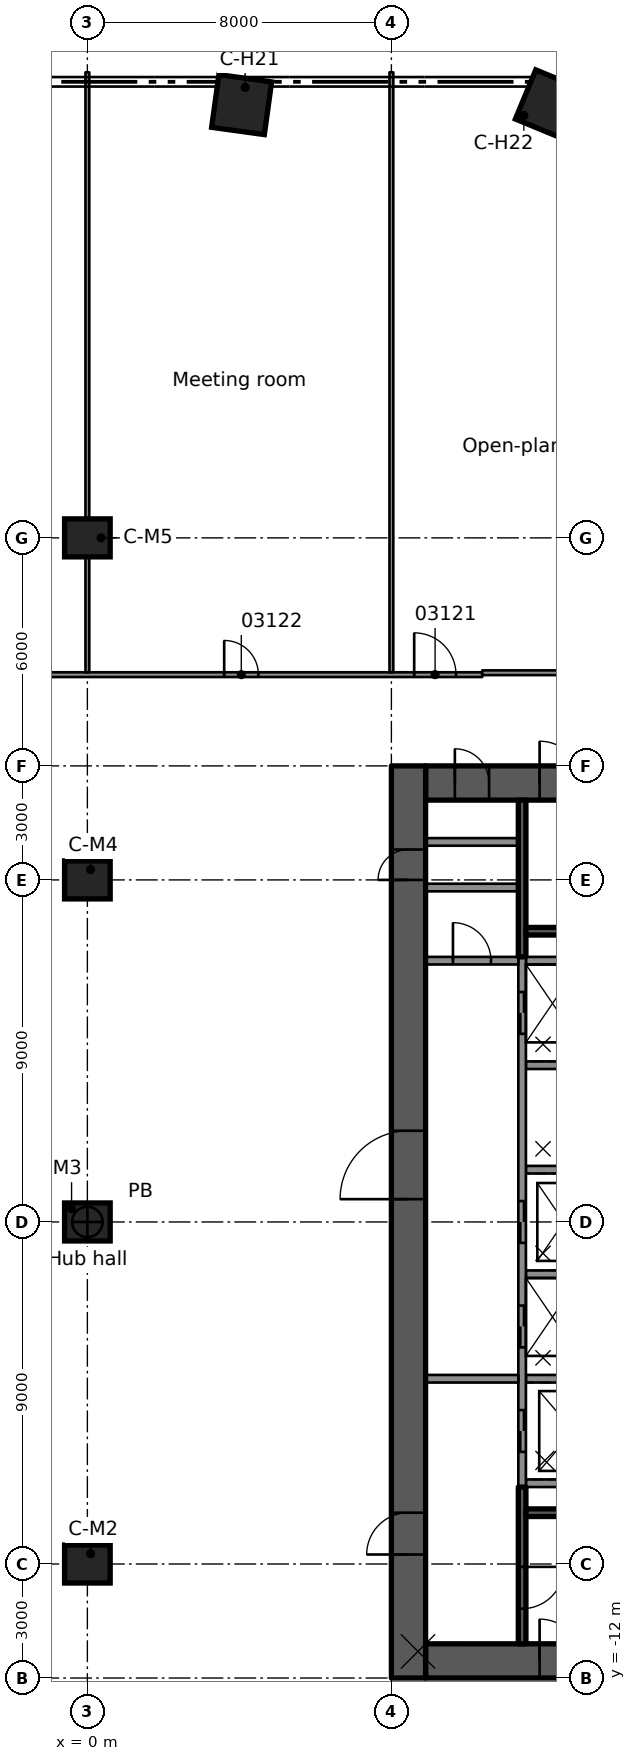
"""IFC4 building model, lengths in metres.
Left out: names, types, materials, properties, quantities, classifications, styles, units other than length and angle.
Written with IfcOpenShell. Run it as: python <this file> out.ifc"""

import sys

from ifc_helpers import new_model, si_unit, direction, frame, frame_2d, origin, origin_2d, place, context, subcontext, project, spatial, rectangle, extrude, element, fill, save


model = new_model("IFC4")
c1 = context("Model", 3, precision=1e-05, world=origin(), true_north=direction((0.0, 1.0)))
c2 = subcontext(c1, "Body", "Model", "MODEL_VIEW")
j1 = project(units=[si_unit("LENGTHUNIT", "METRE"), si_unit("PLANEANGLEUNIT", "RADIAN")], contexts=[c1])
p1 = place(None, origin())
s1 = spatial("IfcSite", under=j1, at=p1, CompositionType="ELEMENT")
p2 = place(p1, origin())
s2 = spatial("IfcBuilding", under=s1, at=p2, CompositionType="ELEMENT")
p3 = place(p2, frame((0.0, 0.0, 15.5)))
s3 = spatial("IfcBuildingStorey", under=s2, at=p3, CompositionType="ELEMENT", Elevation=15.5)
p4 = place(p3, frame((8.9, 11.55, 0.0), z_axis=(0.0, 0.0, 1.0), x_axis=(1.0, 0.0, 0.0)))
e1 = element("IfcWall", 1, at=p4, inside=s3, PredefinedType="SHEAR", context=c2, shape_type="SweptSolid", body=[
    extrude(rectangle(XDim=9.2, YDim=0.9, at=frame_2d((4.6, 0.0))), origin(), (0.0, 0.0, 1.0), 5.0),
])
p5 = place(p4, frame((3.0, 0.0, 0.0)))
e2 = element("IfcOpeningElement", 2, at=p5, cuts=e1, PredefinedType="OPENING", context=c2, shape_type="SweptSolid", body=[
    extrude(rectangle(XDim=1.1, YDim=2.1, at=frame_2d((0.55, 1.05))), frame((0.0, 0.46, 0.0), z_axis=(0.0, -1.0, 0.0), x_axis=(1.0, 0.0, 0.0)), (0.0, 0.0, 1.0), 0.92),
])
p6 = place(p4, frame((0.77, 0.0, 0.0)))
e3 = element("IfcOpeningElement", 3, at=p6, cuts=e1, PredefinedType="OPENING", context=c2, shape_type="SweptSolid", body=[
    extrude(rectangle(XDim=0.9, YDim=2.1, at=frame_2d((0.45, 1.05))), frame((0.0, 0.46, 0.0), z_axis=(0.0, -1.0, 0.0), x_axis=(1.0, 0.0, 0.0)), (0.0, 0.0, 1.0), 0.92),
])
p7 = place(p3, frame((8.9, -11.55, 0.0), z_axis=(0.0, 0.0, 1.0), x_axis=(1.0, 0.0, 0.0)))
e4 = element("IfcWall", 4, at=p7, inside=s3, PredefinedType="SHEAR", context=c2, shape_type="SweptSolid", body=[
    extrude(rectangle(XDim=9.2, YDim=0.9, at=frame_2d((4.6, 0.0))), origin(), (0.0, 0.0, 1.0), 5.0),
])
p8 = place(p7, frame((3.0, 0.0, 0.0)))
e5 = element("IfcOpeningElement", 5, at=p8, cuts=e4, PredefinedType="OPENING", context=c2, shape_type="SweptSolid", body=[
    extrude(rectangle(XDim=1.1, YDim=2.1, at=frame_2d((0.55, 1.05))), frame((0.0, 0.46, 0.0), z_axis=(0.0, -1.0, 0.0), x_axis=(1.0, 0.0, 0.0)), (0.0, 0.0, 1.0), 0.92),
])
p9 = place(p3, frame((8.45, -12.0, 0.0), z_axis=(0.0, 0.0, 1.0), x_axis=(0.0, 1.0, 0.0)))
e6 = element("IfcWall", 6, at=p9, inside=s3, PredefinedType="SHEAR", context=c2, shape_type="SweptSolid", body=[
    extrude(rectangle(XDim=24.0, YDim=0.9, at=frame_2d((12.0, 0.0))), origin(), (0.0, 0.0, 1.0), 5.0),
])
p10 = place(p9, frame((12.6, 0.0, 0.0)))
e7 = element("IfcOpeningElement", 7, at=p10, cuts=e6, PredefinedType="OPENING", context=c2, shape_type="SweptSolid", body=[
    extrude(rectangle(XDim=1.8, YDim=2.1, at=frame_2d((0.9, 1.05))), frame((0.0, 0.46, 0.0), z_axis=(0.0, -1.0, 0.0), x_axis=(1.0, 0.0, 0.0)), (0.0, 0.0, 1.0), 0.92),
])
p11 = place(p9, frame((3.25, 0.0, 0.0)))
e8 = element("IfcOpeningElement", 8, at=p11, cuts=e6, PredefinedType="OPENING", context=c2, shape_type="SweptSolid", body=[
    extrude(rectangle(XDim=1.1, YDim=2.1, at=frame_2d((0.55, 1.05))), frame((0.0, 0.46, 0.0), z_axis=(0.0, -1.0, 0.0), x_axis=(1.0, 0.0, 0.0)), (0.0, 0.0, 1.0), 0.92),
])
p12 = place(p9, frame((21.0, 0.0, 0.0)))
e9 = element("IfcOpeningElement", 9, at=p12, cuts=e6, PredefinedType="OPENING", context=c2, shape_type="SweptSolid", body=[
    extrude(rectangle(XDim=0.8, YDim=2.1, at=frame_2d((0.4, 1.05))), frame((0.0, 0.46, 0.0), z_axis=(0.0, -1.0, 0.0), x_axis=(1.0, 0.0, 0.0)), (0.0, 0.0, 1.0), 0.92),
])
for number, where, z_axis, x_axis in (
    (10, (4.059, 29.4, 0.0), (0.0, 0.0, 1.0), (0.137, 0.991, 0.0)),
    (11, (12.178, 29.4, 0.0), (0.0, 0.0, 1.0), (0.383, 0.924, 0.0)),
):
    element("IfcColumn", number, at=place(p3, frame(where, z_axis=z_axis, x_axis=x_axis)), inside=s3, PredefinedType="COLUMN", context=c2, shape_type="SweptSolid", body=[
        extrude(rectangle(XDim=1.4, YDim=1.4, at=origin_2d()), origin(), (0.0, 0.0, 1.0), 5.0),
    ])
for number, where, z_axis, x_axis in (
    (12, (0.0, -9.0, 0.0), (0.0, 0.0, 1.0), (1.0, 0.0, 0.0)),
    (13, (0.0, 0.0, 0.0), (0.0, 0.0, 1.0), (1.0, 0.0, 0.0)),
    (14, (0.0, 9.0, 0.0), (0.0, 0.0, 1.0), (1.0, 0.0, 0.0)),
    (15, (0.0, 18.0, 0.0), (0.0, 0.0, 1.0), (1.0, 0.0, 0.0)),
):
    element("IfcColumn", number, at=place(p3, frame(where, z_axis=z_axis, x_axis=x_axis)), inside=s3, PredefinedType="COLUMN", context=c2, shape_type="SweptSolid", body=[
        extrude(rectangle(XDim=1.2, YDim=1.0, at=origin_2d()), origin(), (0.0, 0.0, 1.0), 5.0),
    ])
for number, where, z_axis, x_axis in (
    (16, (11.54, -6.875, 0.0), (0.0, 0.0, 1.0), (1.0, 0.0, 0.0)),
    (17, (11.54, 6.875, 0.0), (0.0, 0.0, 1.0), (1.0, 0.0, 0.0)),
):
    element("IfcWall", number, at=place(p3, frame(where, z_axis=z_axis, x_axis=x_axis)), inside=s3, PredefinedType="SOLIDWALL", context=c2, shape_type="SweptSolid", body=[
        extrude(rectangle(XDim=6.56, YDim=0.2, at=frame_2d((3.28, 0.0))), origin(), (0.0, 0.0, 1.0), 4.59),
    ])
p13 = place(p3, frame((11.54, 4.125, 0.0), z_axis=(0.0, 0.0, 1.0), x_axis=(1.0, 0.0, 0.0)))
e18 = element("IfcWall", 18, at=p13, inside=s3, PredefinedType="SOLIDWALL", context=c2, shape_type="SweptSolid", body=[
    extrude(rectangle(XDim=4.7, YDim=0.2, at=frame_2d((2.35, 0.0))), origin(), (0.0, 0.0, 1.0), 4.59),
])
for number, where, z_axis, x_axis in (
    (19, (11.54, 1.375, 0.0), (0.0, 0.0, 1.0), (1.0, 0.0, 0.0)),
    (20, (11.54, -1.375, 0.0), (0.0, 0.0, 1.0), (1.0, 0.0, 0.0)),
):
    element("IfcWall", number, at=place(p3, frame(where, z_axis=z_axis, x_axis=x_axis)), inside=s3, PredefinedType="SOLIDWALL", context=c2, shape_type="SweptSolid", body=[
        extrude(rectangle(XDim=4.2, YDim=0.2, at=frame_2d((2.1, 0.0))), origin(), (0.0, 0.0, 1.0), 4.59),
    ])
p14 = place(p3, frame((11.54, -4.125, 0.0), z_axis=(0.0, 0.0, 1.0), x_axis=(1.0, 0.0, 0.0)))
e21 = element("IfcWall", 21, at=p14, inside=s3, PredefinedType="SOLIDWALL", context=c2, shape_type="SweptSolid", body=[
    extrude(rectangle(XDim=4.7, YDim=0.2, at=frame_2d((2.35, 0.0))), origin(), (0.0, 0.0, 1.0), 4.59),
])
p15 = place(p3, frame((11.44, 6.975, 0.0), z_axis=(0.0, 0.0, 1.0), x_axis=(0.0, -1.0, 0.0)))
e22 = element("IfcWall", 22, at=p15, inside=s3, PredefinedType="SOLIDWALL", context=c2, shape_type="SweptSolid", body=[
    extrude(rectangle(XDim=13.95, YDim=0.2, at=frame_2d((6.975, 0.0))), origin(), (0.0, 0.0, 1.0), 4.59),
])
p16 = place(p15, frame((0.925, 0.0, 0.0)))
e23 = element("IfcOpeningElement", 23, at=p16, cuts=e22, PredefinedType="OPENING", context=c2, shape_type="SweptSolid", body=[
    extrude(rectangle(XDim=1.1, YDim=2.1, at=frame_2d((0.55, 1.05))), frame((0.0, 0.11, 0.0), z_axis=(0.0, -1.0, 0.0), x_axis=(1.0, 0.0, 0.0)), (0.0, 0.0, 1.0), 0.22),
])
p17 = place(p15, frame((6.425, 0.0, 0.0)))
e24 = element("IfcOpeningElement", 24, at=p17, cuts=e22, PredefinedType="OPENING", context=c2, shape_type="SweptSolid", body=[
    extrude(rectangle(XDim=1.1, YDim=2.1, at=frame_2d((0.55, 1.05))), frame((0.0, 0.11, 0.0), z_axis=(0.0, -1.0, 0.0), x_axis=(1.0, 0.0, 0.0)), (0.0, 0.0, 1.0), 0.22),
])
p18 = place(p15, frame((9.175, 0.0, 0.0)))
e25 = element("IfcOpeningElement", 25, at=p18, cuts=e22, PredefinedType="OPENING", context=c2, shape_type="SweptSolid", body=[
    extrude(rectangle(XDim=1.1, YDim=2.1, at=frame_2d((0.55, 1.05))), frame((0.0, 0.11, 0.0), z_axis=(0.0, -1.0, 0.0), x_axis=(1.0, 0.0, 0.0)), (0.0, 0.0, 1.0), 0.22),
])
p19 = place(p15, frame((11.925, 0.0, 0.0)))
e26 = element("IfcOpeningElement", 26, at=p19, cuts=e22, PredefinedType="OPENING", context=c2, shape_type="SweptSolid", body=[
    extrude(rectangle(XDim=1.1, YDim=2.1, at=frame_2d((0.55, 1.05))), frame((0.0, 0.11, 0.0), z_axis=(0.0, -1.0, 0.0), x_axis=(1.0, 0.0, 0.0)), (0.0, 0.0, 1.0), 0.22),
])
p20 = place(p3, frame((11.44, -6.975, 0.0), z_axis=(0.0, 0.0, 1.0), x_axis=(0.0, -1.0, 0.0)))
e27 = element("IfcWall", 27, at=p20, inside=s3, PredefinedType="SOLIDWALL", context=c2, shape_type="SweptSolid", body=[
    extrude(rectangle(XDim=4.125, YDim=0.2, at=frame_2d((2.062, 0.0))), origin(), (0.0, 0.0, 1.0), 4.59),
])
p21 = place(p20, frame((2.1, 0.0, 0.0)))
e28 = element("IfcOpeningElement", 28, at=p21, cuts=e27, PredefinedType="OPENING", context=c2, shape_type="SweptSolid", body=[
    extrude(rectangle(XDim=1.1, YDim=2.1, at=frame_2d((0.55, 1.05))), frame((0.0, 0.11, 0.0), z_axis=(0.0, -1.0, 0.0), x_axis=(1.0, 0.0, 0.0)), (0.0, 0.0, 1.0), 0.22),
])
p22 = place(p3, frame((11.54, -7.65, 0.0), z_axis=(0.0, 0.0, 1.0), x_axis=(1.0, 0.0, 0.0)))
e29 = element("IfcWall", 29, at=p22, inside=s3, PredefinedType="SOLIDWALL", context=c2, shape_type="SweptSolid", body=[
    extrude(rectangle(XDim=6.56, YDim=0.2, at=frame_2d((3.28, 0.0))), origin(), (0.0, 0.0, 1.0), 4.59),
])
p23 = place(p3, frame((11.44, 11.1, 0.0), z_axis=(0.0, 0.0, 1.0), x_axis=(0.0, -1.0, 0.0)))
e30 = element("IfcWall", 30, at=p23, inside=s3, PredefinedType="SOLIDWALL", context=c2, shape_type="SweptSolid", body=[
    extrude(rectangle(XDim=4.125, YDim=0.2, at=frame_2d((2.062, 0.0))), origin(), (0.0, 0.0, 1.0), 4.59),
])
p24 = place(p3, frame((11.54, 7.65, 0.0), z_axis=(0.0, 0.0, 1.0), x_axis=(1.0, 0.0, 0.0)))
e31 = element("IfcWall", 31, at=p24, inside=s3, PredefinedType="SOLIDWALL", context=c2, shape_type="SweptSolid", body=[
    extrude(rectangle(XDim=6.56, YDim=0.2, at=frame_2d((3.28, 0.0))), origin(), (0.0, 0.0, 1.0), 4.59),
])
p25 = place(p3, frame((8.9, -4.125, 0.0), z_axis=(0.0, 0.0, 1.0), x_axis=(1.0, 0.0, 0.0)))
e32 = element("IfcWall", 32, at=p25, inside=s3, PredefinedType="PARTITIONING", context=c2, shape_type="SweptSolid", body=[
    extrude(rectangle(XDim=2.44, YDim=0.2, at=frame_2d((1.22, 0.0))), origin(), (0.0, 0.0, 1.0), 4.59),
])
p26 = place(p3, frame((8.9, 6.875, 0.0), z_axis=(0.0, 0.0, 1.0), x_axis=(1.0, 0.0, 0.0)))
e33 = element("IfcWall", 33, at=p26, inside=s3, PredefinedType="PARTITIONING", context=c2, shape_type="SweptSolid", body=[
    extrude(rectangle(XDim=2.44, YDim=0.2, at=frame_2d((1.22, 0.0))), origin(), (0.0, 0.0, 1.0), 4.59),
])
p27 = place(p26, frame((0.72, 0.0, 0.0)))
e34 = element("IfcOpeningElement", 34, at=p27, cuts=e33, PredefinedType="OPENING", context=c2, shape_type="SweptSolid", body=[
    extrude(rectangle(XDim=1.0, YDim=2.1, at=frame_2d((0.5, 1.05))), frame((0.0, 0.11, 0.0), z_axis=(0.0, -1.0, 0.0), x_axis=(1.0, 0.0, 0.0)), (0.0, 0.0, 1.0), 0.22),
])
for number, where, z_axis, x_axis in (
    (35, (8.9, 10.0, 0.0), (0.0, 0.0, 1.0), (1.0, 0.0, 0.0)),
    (36, (8.9, 8.8, 0.0), (0.0, 0.0, 1.0), (1.0, 0.0, 0.0)),
):
    element("IfcWall", number, at=place(p3, frame(where, z_axis=z_axis, x_axis=x_axis)), inside=s3, PredefinedType="PARTITIONING", context=c2, shape_type="SweptSolid", body=[
        extrude(rectangle(XDim=2.44, YDim=0.2, at=frame_2d((1.22, 0.0))), origin(), (0.0, 0.0, 1.0), 4.59),
    ])
p28 = place(p3, frame((-10.39, 14.401, 0.0), z_axis=(0.0, 0.0, 1.0), x_axis=(1.0, 0.0, 0.0)))
e37 = element("IfcWall", 37, at=p28, inside=s3, PredefinedType="PARTITIONING", context=c2, shape_type="SweptSolid", body=[
    extrude(rectangle(XDim=20.781, YDim=0.125, at=frame_2d((10.391, 0.0))), origin(), (0.0, 0.0, 1.0), 4.58),
])
p29 = place(p28, frame((18.99, 0.0, 0.0)))
e38 = element("IfcOpeningElement", 38, at=p29, cuts=e37, PredefinedType="OPENING", context=c2, shape_type="SweptSolid", body=[
    extrude(rectangle(XDim=1.1, YDim=2.1, at=frame_2d((0.55, 1.05))), frame((0.0, 0.073, 0.0), z_axis=(0.0, -1.0, 0.0), x_axis=(1.0, 0.0, 0.0)), (0.0, 0.0, 1.0), 0.145),
])
p30 = place(p28, frame((13.99, 0.0, 0.0)))
e39 = element("IfcOpeningElement", 39, at=p30, cuts=e37, PredefinedType="OPENING", context=c2, shape_type="SweptSolid", body=[
    extrude(rectangle(XDim=0.9, YDim=2.1, at=frame_2d((0.45, 1.05))), frame((0.0, 0.073, 0.0), z_axis=(0.0, -1.0, 0.0), x_axis=(1.0, 0.0, 0.0)), (0.0, 0.0, 1.0), 0.145),
])
p31 = place(p28, frame((5.99, 0.0, 0.0)))
e40 = element("IfcOpeningElement", 40, at=p31, cuts=e37, PredefinedType="OPENING", context=c2, shape_type="SweptSolid", body=[
    extrude(rectangle(XDim=0.9, YDim=2.1, at=frame_2d((0.45, 1.05))), frame((0.0, 0.073, 0.0), z_axis=(0.0, -1.0, 0.0), x_axis=(1.0, 0.0, 0.0)), (0.0, 0.0, 1.0), 0.145),
])
p32 = place(p28, frame((0.6, 0.0, 0.0)))
e41 = element("IfcOpeningElement", 41, at=p32, cuts=e37, PredefinedType="OPENING", context=c2, shape_type="SweptSolid", body=[
    extrude(rectangle(XDim=1.1, YDim=2.1, at=frame_2d((0.55, 1.05))), frame((0.0, 0.073, 0.0), z_axis=(0.0, -1.0, 0.0), x_axis=(1.0, 0.0, 0.0)), (0.0, 0.0, 1.0), 0.145),
])
p33 = place(p3, frame((10.391, 14.451, 0.0), z_axis=(0.0, 0.0, 1.0), x_axis=(1.0, 0.0, 0.0)))
e42 = element("IfcWall", 42, at=p33, inside=s3, PredefinedType="PARTITIONING", context=c2, shape_type="SweptSolid", body=[
    extrude(rectangle(XDim=10.996, YDim=0.125, at=frame_2d((5.498, 0.0))), origin(), (0.0, 0.0, 1.0), 4.58),
])
p34 = place(p33, frame((7.38, 0.0, 0.0)))
e43 = element("IfcOpeningElement", 43, at=p34, cuts=e42, PredefinedType="OPENING", context=c2, shape_type="SweptSolid", body=[
    extrude(rectangle(XDim=1.8, YDim=2.1, at=frame_2d((0.9, 1.05))), frame((0.0, 0.073, 0.0), z_axis=(0.0, -1.0, 0.0), x_axis=(1.0, 0.0, 0.0)), (0.0, 0.0, 1.0), 0.145),
])
for number, where, z_axis, x_axis in (
    (44, (8.0, 14.463, 0.0), (0.0, 0.0, 1.0), (0.0, 1.0, 0.0)),
    (45, (0.0, 14.463, 0.0), (0.0, 0.0, 1.0), (0.0, 1.0, 0.0)),
):
    element("IfcWall", number, at=place(p3, frame(where, z_axis=z_axis, x_axis=x_axis)), inside=s3, PredefinedType="PARTITIONING", context=c2, shape_type="SweptSolid", body=[
        extrude(rectangle(XDim=15.787, YDim=0.1, at=frame_2d((7.894, 0.0))), origin(), (0.0, 0.0, 1.0), 4.58),
    ])
p35 = place(p16, origin())
e46 = element("IfcDoor", 46, at=p35, inside=s3, OperationType="DOUBLE_DOOR_SLIDING", PredefinedType="DOOR", context=c2, shape_type="SweptSolid", body=[
    extrude(rectangle(XDim=1.1, YDim=2.1, at=frame_2d((0.55, 1.05))), frame((0.0, 0.025, 0.0), z_axis=(0.0, -1.0, 0.0), x_axis=(1.0, 0.0, 0.0)), (0.0, 0.0, 1.0), 0.05),
])
fill(e23, e46)
p36 = place(p17, origin())
e47 = element("IfcDoor", 47, at=p36, inside=s3, OperationType="DOUBLE_DOOR_SLIDING", PredefinedType="DOOR", context=c2, shape_type="SweptSolid", body=[
    extrude(rectangle(XDim=1.1, YDim=2.1, at=frame_2d((0.55, 1.05))), frame((0.0, 0.025, 0.0), z_axis=(0.0, -1.0, 0.0), x_axis=(1.0, 0.0, 0.0)), (0.0, 0.0, 1.0), 0.05),
])
fill(e24, e47)
p37 = place(p18, origin())
e48 = element("IfcDoor", 48, at=p37, inside=s3, OperationType="DOUBLE_DOOR_SLIDING", PredefinedType="DOOR", context=c2, shape_type="SweptSolid", body=[
    extrude(rectangle(XDim=1.1, YDim=2.1, at=frame_2d((0.55, 1.05))), frame((0.0, 0.025, 0.0), z_axis=(0.0, -1.0, 0.0), x_axis=(1.0, 0.0, 0.0)), (0.0, 0.0, 1.0), 0.05),
])
fill(e25, e48)
p38 = place(p19, origin())
e49 = element("IfcDoor", 49, at=p38, inside=s3, OperationType="DOUBLE_DOOR_SLIDING", PredefinedType="DOOR", context=c2, shape_type="SweptSolid", body=[
    extrude(rectangle(XDim=1.1, YDim=2.1, at=frame_2d((0.55, 1.05))), frame((0.0, 0.025, 0.0), z_axis=(0.0, -1.0, 0.0), x_axis=(1.0, 0.0, 0.0)), (0.0, 0.0, 1.0), 0.05),
])
fill(e26, e49)
p39 = place(p10, origin())
e50 = element("IfcDoor", 50, at=p39, inside=s3, OperationType="SINGLE_SWING_RIGHT", PredefinedType="DOOR", context=c2, shape_type="SweptSolid", body=[
    extrude(rectangle(XDim=1.8, YDim=2.1, at=frame_2d((0.9, 1.05))), frame((0.0, 0.025, 0.0), z_axis=(0.0, -1.0, 0.0), x_axis=(1.0, 0.0, 0.0)), (0.0, 0.0, 1.0), 0.05),
])
fill(e7, e50)
p40 = place(p11, origin())
e51 = element("IfcDoor", 51, at=p40, inside=s3, OperationType="SINGLE_SWING_LEFT", PredefinedType="DOOR", context=c2, shape_type="SweptSolid", body=[
    extrude(rectangle(XDim=1.1, YDim=2.1, at=frame_2d((0.55, 1.05))), frame((0.0, 0.025, 0.0), z_axis=(0.0, -1.0, 0.0), x_axis=(1.0, 0.0, 0.0)), (0.0, 0.0, 1.0), 0.05),
])
fill(e8, e51)
p41 = place(p8, origin())
e52 = element("IfcDoor", 52, at=p41, inside=s3, OperationType="SINGLE_SWING_LEFT", PredefinedType="DOOR", context=c2, shape_type="SweptSolid", body=[
    extrude(rectangle(XDim=1.1, YDim=2.1, at=frame_2d((0.55, 1.05))), frame((0.0, 0.025, 0.0), z_axis=(0.0, -1.0, 0.0), x_axis=(1.0, 0.0, 0.0)), (0.0, 0.0, 1.0), 0.05),
])
fill(e5, e52)
p42 = place(p5, origin())
e53 = element("IfcDoor", 53, at=p42, inside=s3, OperationType="SINGLE_SWING_LEFT", PredefinedType="DOOR", context=c2, shape_type="SweptSolid", body=[
    extrude(rectangle(XDim=1.1, YDim=2.1, at=frame_2d((0.55, 1.05))), frame((0.0, 0.025, 0.0), z_axis=(0.0, -1.0, 0.0), x_axis=(1.0, 0.0, 0.0)), (0.0, 0.0, 1.0), 0.05),
])
fill(e2, e53)
p43 = place(p21, origin())
e54 = element("IfcDoor", 54, at=p43, inside=s3, OperationType="SINGLE_SWING_RIGHT", PredefinedType="DOOR", context=c2, shape_type="SweptSolid", body=[
    extrude(rectangle(XDim=1.1, YDim=2.1, at=frame_2d((0.55, 1.05))), frame((0.0, 0.025, 0.0), z_axis=(0.0, -1.0, 0.0), x_axis=(1.0, 0.0, 0.0)), (0.0, 0.0, 1.0), 0.05),
])
fill(e28, e54)
p44 = place(p6, origin())
e55 = element("IfcDoor", 55, at=p44, inside=s3, OperationType="SINGLE_SWING_LEFT", PredefinedType="DOOR", context=c2, shape_type="SweptSolid", body=[
    extrude(rectangle(XDim=0.9, YDim=2.1, at=frame_2d((0.45, 1.05))), frame((0.0, 0.025, 0.0), z_axis=(0.0, -1.0, 0.0), x_axis=(1.0, 0.0, 0.0)), (0.0, 0.0, 1.0), 0.05),
])
fill(e3, e55)
p45 = place(p12, origin())
e56 = element("IfcDoor", 56, at=p45, inside=s3, OperationType="SINGLE_SWING_RIGHT", PredefinedType="DOOR", context=c2, shape_type="SweptSolid", body=[
    extrude(rectangle(XDim=0.8, YDim=2.1, at=frame_2d((0.4, 1.05))), frame((0.0, 0.025, 0.0), z_axis=(0.0, -1.0, 0.0), x_axis=(1.0, 0.0, 0.0)), (0.0, 0.0, 1.0), 0.05),
])
fill(e9, e56)
p46 = place(p27, origin())
e57 = element("IfcDoor", 57, at=p46, inside=s3, OperationType="SINGLE_SWING_RIGHT", PredefinedType="DOOR", context=c2, shape_type="SweptSolid", body=[
    extrude(rectangle(XDim=1.0, YDim=2.1, at=frame_2d((0.5, 1.05))), frame((0.0, 0.025, 0.0), z_axis=(0.0, -1.0, 0.0), x_axis=(1.0, 0.0, 0.0)), (0.0, 0.0, 1.0), 0.05),
])
fill(e34, e57)
p47 = place(p29, origin())
e58 = element("IfcDoor", 58, at=p47, inside=s3, OperationType="SINGLE_SWING_RIGHT", PredefinedType="DOOR", context=c2, shape_type="SweptSolid", body=[
    extrude(rectangle(XDim=1.1, YDim=2.1, at=frame_2d((0.55, 1.05))), frame((0.0, 0.025, 0.0), z_axis=(0.0, -1.0, 0.0), x_axis=(1.0, 0.0, 0.0)), (0.0, 0.0, 1.0), 0.05),
])
fill(e38, e58)
p48 = place(p30, origin())
e59 = element("IfcDoor", 59, at=p48, inside=s3, OperationType="SINGLE_SWING_RIGHT", PredefinedType="DOOR", context=c2, shape_type="SweptSolid", body=[
    extrude(rectangle(XDim=0.9, YDim=2.1, at=frame_2d((0.45, 1.05))), frame((0.0, 0.025, 0.0), z_axis=(0.0, -1.0, 0.0), x_axis=(1.0, 0.0, 0.0)), (0.0, 0.0, 1.0), 0.05),
])
fill(e39, e59)
save(model, sys.argv[1])
